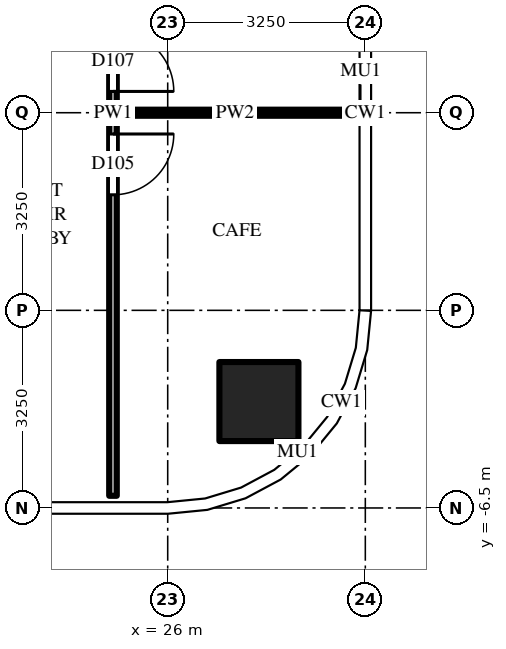
"""IFC4 building model, lengths in metres.
Left out: names, types, materials, properties, quantities, classifications, styles, units other than length and angle.
Written with IfcOpenShell. Run it as: python <this file> out.ifc"""

import sys

from ifc_helpers import new_model, si_unit, direction, frame, frame_2d, origin, origin_2d, place, context, subcontext, project, spatial, rectangle, extrude, source, transform, mapped, element, fill, save


model = new_model("IFC4")
c1 = context("Model", 3, precision=1e-05, world=origin(), true_north=direction((0.0, 1.0)))
c2 = subcontext(c1, "Body", "Model", "MODEL_VIEW")
j1 = project(units=[si_unit("LENGTHUNIT", "METRE"), si_unit("PLANEANGLEUNIT", "RADIAN")], contexts=[c1])
p1 = place(None, origin())
s1 = spatial("IfcSite", under=j1, at=p1, CompositionType="ELEMENT")
p2 = place(p1, origin())
s2 = spatial("IfcBuilding", under=s1, at=p2, CompositionType="ELEMENT")
p3 = place(p2, frame((0.0, 0.0, 102.0)))
s3 = spatial("IfcBuildingStorey", under=s2, at=p3, CompositionType="ELEMENT", Elevation=102.0)
m1 = source(origin(), c2, "Body", "SweptSolid", [
    extrude(rectangle(XDim=1.3, YDim=1.3, at=origin_2d()), origin(), (0.0, 0.0, 1.0), 4.5),
])
p4 = place(p3, frame((27.5, -4.75, 0.0), z_axis=(0.0, 0.0, 1.0), x_axis=(1.0, 0.0, 0.0)))
e1 = element("IfcColumn", 1, at=p4, inside=s3, PredefinedType="COLUMN", context=c2, shape_type="MappedRepresentation", body=[
    mapped(m1, transform((0.0, 0.0, 0.0))),
])
m2 = source(origin(), c2, "Body", "SweptSolid", [
    extrude(rectangle(XDim=12.6, YDim=0.125, at=frame_2d((6.3, 0.0))), origin(), (0.0, 0.0, 1.0), 3.33),
])
p5 = place(p3, frame((25.1, 6.3, 0.0), z_axis=(0.0, 0.0, 1.0), x_axis=(0.0, -1.0, 0.0)))
e2 = element("IfcWall", 2, at=p5, inside=s3, PredefinedType="PARTITIONING", context=c2, shape_type="MappedRepresentation", body=[
    mapped(m2, transform((0.0, 0.0, 0.0))),
])
m3 = source(origin(), c2, "Body", "SweptSolid", [
    extrude(rectangle(XDim=1.0, YDim=2.1, at=frame_2d((0.5, 1.05))), frame((0.0, 0.073, 0.0), z_axis=(0.0, -1.0, 0.0), x_axis=(1.0, 0.0, 0.0)), (0.0, 0.0, 1.0), 0.145),
])
p6 = place(p5, frame((6.65, 0.0, 0.0)))
e3 = element("IfcOpeningElement", 3, at=p6, cuts=e2, PredefinedType="OPENING", context=c2, shape_type="MappedRepresentation", body=[
    mapped(m3, transform((0.0, 0.0, 0.0))),
])
p7 = place(p5, frame((4.95, 0.0, 0.0)))
e4 = element("IfcOpeningElement", 4, at=p7, cuts=e2, PredefinedType="OPENING", context=c2, shape_type="MappedRepresentation", body=[
    mapped(m3, transform((0.0, 0.0, 0.0))),
])
m4 = source(origin(), c2, "Body", "SweptSolid", [
    extrude(rectangle(XDim=3.887, YDim=0.1, at=frame_2d((1.944, 0.0))), origin(), (0.0, 0.0, 1.0), 3.33),
])
p8 = place(p3, frame((25.163, 0.0, 0.0), z_axis=(0.0, 0.0, 1.0), x_axis=(1.0, 0.0, 0.0)))
e5 = element("IfcWall", 5, at=p8, inside=s3, PredefinedType="PARTITIONING", context=c2, shape_type="MappedRepresentation", body=[
    mapped(m4, transform((0.0, 0.0, 0.0))),
])
m5 = source(origin(), c2, "Body", "SweptSolid", [
    extrude(rectangle(XDim=1.0, YDim=2.1, at=frame_2d((0.5, 1.05))), frame((0.0, 0.025, 0.0), z_axis=(0.0, -1.0, 0.0), x_axis=(1.0, 0.0, 0.0)), (0.0, 0.0, 1.0), 0.05),
])
p9 = place(p6, origin())
e6 = element("IfcDoor", 6, at=p9, inside=s3, OperationType="SINGLE_SWING_LEFT", PredefinedType="DOOR", context=c2, shape_type="MappedRepresentation", body=[
    mapped(m5, transform((0.0, 0.0, 0.0))),
])
fill(e3, e6)
p10 = place(p7, origin())
e7 = element("IfcDoor", 7, at=p10, inside=s3, OperationType="SINGLE_SWING_RIGHT", PredefinedType="DOOR", context=c2, shape_type="MappedRepresentation", body=[
    mapped(m5, transform((0.0, 0.0, 0.0))),
])
fill(e4, e7)
save(model, sys.argv[1])
